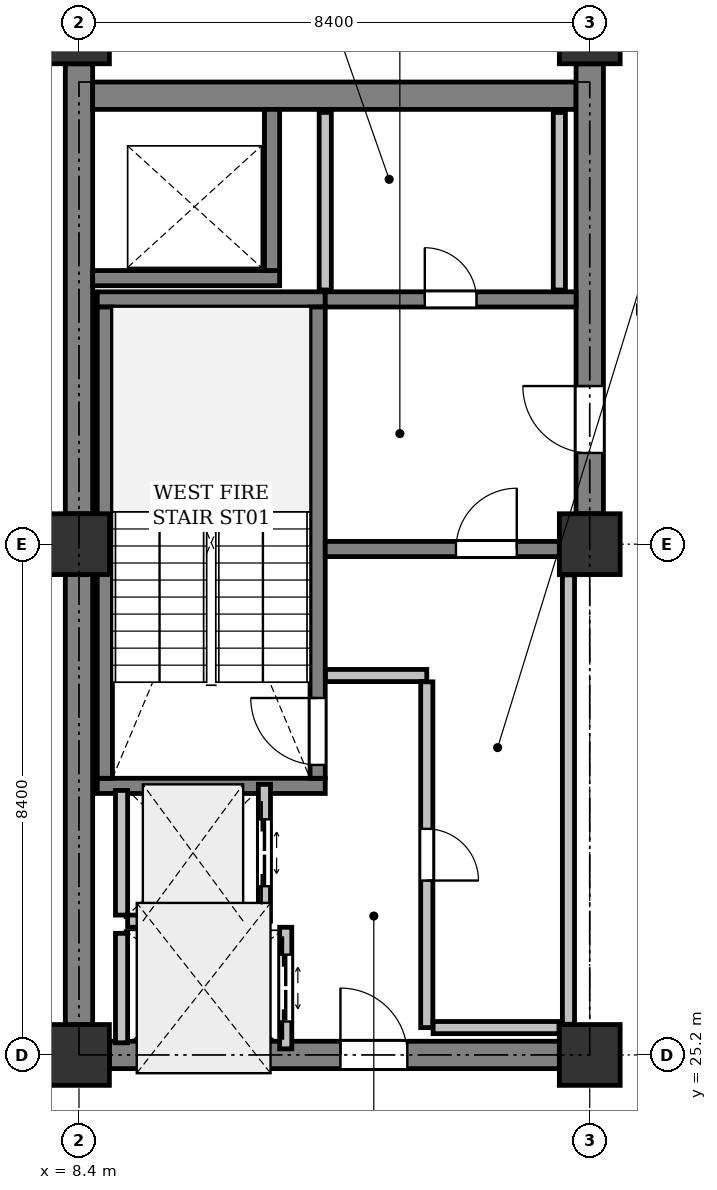
"""IFC4 building model, lengths in metres.
Left out: names, types, materials, properties, quantities, classifications, styles, units other than length and angle.
Written with IfcOpenShell. Run it as: python <this file> out.ifc"""

import sys

from ifc_helpers import new_model, si_unit, direction, frame, frame_2d, origin, origin_2d, place, context, subcontext, project, spatial, rectangle, extrude, element, fill, save


model = new_model("IFC4")
c1 = context("Model", 3, precision=1e-05, world=origin(), true_north=direction((0.0, 1.0)))
c2 = subcontext(c1, "Body", "Model", "MODEL_VIEW")
j1 = project(units=[si_unit("LENGTHUNIT", "METRE"), si_unit("PLANEANGLEUNIT", "RADIAN")], contexts=[c1])
p1 = place(None, origin())
s1 = spatial("IfcSite", under=j1, at=p1, CompositionType="ELEMENT")
p2 = place(p1, origin())
s2 = spatial("IfcBuilding", under=s1, at=p2, CompositionType="ELEMENT")
p3 = place(p2, frame((0.0, 0.0, 237.0)))
s3 = spatial("IfcBuildingStorey", under=s2, at=p3, CompositionType="ELEMENT", Elevation=237.0)
for number, where, z_axis, x_axis in (
    (1, (8.4, 25.2, 0.0), (0.0, 0.0, 1.0), (1.0, 0.0, 0.0)),
    (2, (8.4, 33.6, 0.0), (0.0, 0.0, 1.0), (1.0, 0.0, 0.0)),
    (3, (8.4, 42.0, 0.0), (0.0, 0.0, 1.0), (1.0, 0.0, 0.0)),
    (4, (16.8, 25.2, 0.0), (0.0, 0.0, 1.0), (1.0, 0.0, 0.0)),
    (5, (16.8, 33.6, 0.0), (0.0, 0.0, 1.0), (1.0, 0.0, 0.0)),
    (6, (16.8, 42.0, 0.0), (0.0, 0.0, 1.0), (1.0, 0.0, 0.0)),
):
    element("IfcColumn", number, at=place(p3, frame(where, z_axis=z_axis, x_axis=x_axis)), inside=s3, PredefinedType="COLUMN", context=c2, shape_type="SweptSolid", body=[
        extrude(rectangle(XDim=1.0, YDim=1.0, at=origin_2d()), origin(), (0.0, 0.0, 1.0), 4.1),
    ])
p4 = place(p3, frame((8.4, 25.7, 0.0), z_axis=(0.0, 0.0, 1.0), x_axis=(0.0, 1.0, 0.0)))
e7 = element("IfcWall", 7, at=p4, inside=s3, PredefinedType="SHEAR", context=c2, shape_type="SweptSolid", body=[
    extrude(rectangle(XDim=7.4, YDim=0.45, at=frame_2d((3.7, 0.0))), origin(), (0.0, 0.0, 1.0), 3.825),
])
p5 = place(p3, frame((8.4, 34.1, 0.0), z_axis=(0.0, 0.0, 1.0), x_axis=(0.0, 1.0, 0.0)))
e8 = element("IfcWall", 8, at=p5, inside=s3, PredefinedType="SHEAR", context=c2, shape_type="SweptSolid", body=[
    extrude(rectangle(XDim=7.4, YDim=0.45, at=frame_2d((3.7, 0.0))), origin(), (0.0, 0.0, 1.0), 3.825),
])
p6 = place(p3, frame((8.625, 40.975, 0.0), z_axis=(0.0, 0.0, 1.0), x_axis=(1.0, 0.0, 0.0)))
e9 = element("IfcWall", 9, at=p6, inside=s3, PredefinedType="SHEAR", context=c2, shape_type="SweptSolid", body=[
    extrude(rectangle(XDim=7.95, YDim=0.45, at=frame_2d((3.975, 0.0))), origin(), (0.0, 0.0, 1.0), 3.825),
])
p7 = place(p3, frame((16.8, 34.1, 0.0), z_axis=(0.0, 0.0, 1.0), x_axis=(0.0, 1.0, 0.0)))
e10 = element("IfcWall", 10, at=p7, inside=s3, PredefinedType="SHEAR", context=c2, shape_type="SweptSolid", body=[
    extrude(rectangle(XDim=7.4, YDim=0.45, at=frame_2d((3.7, 0.0))), origin(), (0.0, 0.0, 1.0), 3.825),
])
p8 = place(p7, frame((1.0, 0.0, 0.0)))
e11 = element("IfcOpeningElement", 11, at=p8, cuts=e10, PredefinedType="OPENING", context=c2, shape_type="SweptSolid", body=[
    extrude(rectangle(XDim=1.1, YDim=2.15, at=frame_2d((0.55, 1.075))), frame((0.0, 0.235, 0.0), z_axis=(0.0, -1.0, 0.0), x_axis=(1.0, 0.0, 0.0)), (0.0, 0.0, 1.0), 0.47),
])
p9 = place(p3, frame((8.9, 25.2, 0.0), z_axis=(0.0, 0.0, 1.0), x_axis=(1.0, 0.0, 0.0)))
e12 = element("IfcWall", 12, at=p9, inside=s3, PredefinedType="SHEAR", context=c2, shape_type="SweptSolid", body=[
    extrude(rectangle(XDim=7.4, YDim=0.45, at=frame_2d((3.7, 0.0))), origin(), (0.0, 0.0, 1.0), 3.825),
])
p10 = place(p9, frame((3.8, 0.0, 0.0)))
e13 = element("IfcOpeningElement", 13, at=p10, cuts=e12, PredefinedType="OPENING", context=c2, shape_type="SweptSolid", body=[
    extrude(rectangle(XDim=1.1, YDim=2.15, at=frame_2d((0.55, 1.075))), frame((0.0, 0.235, 0.0), z_axis=(0.0, -1.0, 0.0), x_axis=(1.0, 0.0, 0.0)), (0.0, 0.0, 1.0), 0.47),
])
for number, where, z_axis, x_axis in (
    (14, (12.45, 29.625, 0.0), (0.0, 0.0, 1.0), (-1.0, 0.0, 0.0)),
    (15, (12.45, 37.625, 0.0), (0.0, 0.0, 1.0), (-1.0, 0.0, 0.0)),
):
    element("IfcWall", number, at=place(p3, frame(where, z_axis=z_axis, x_axis=x_axis)), inside=s3, PredefinedType="SHEAR", context=c2, shape_type="SweptSolid", body=[
        extrude(rectangle(XDim=3.75, YDim=0.25, at=frame_2d((1.875, 0.0))), origin(), (0.0, 0.0, 1.0), 3.825),
    ])
p11 = place(p3, frame((12.325, 29.75, 0.0), z_axis=(0.0, 0.0, 1.0), x_axis=(0.0, 1.0, 0.0)))
e16 = element("IfcWall", 16, at=p11, inside=s3, PredefinedType="SHEAR", context=c2, shape_type="SweptSolid", body=[
    extrude(rectangle(XDim=7.75, YDim=0.25, at=frame_2d((3.875, 0.0))), origin(), (0.0, 0.0, 1.0), 3.825),
])
p12 = place(p11, frame((0.22, 0.0, 0.0)))
e17 = element("IfcOpeningElement", 17, at=p12, cuts=e16, PredefinedType="OPENING", context=c2, shape_type="SweptSolid", body=[
    extrude(rectangle(XDim=1.1, YDim=2.15, at=frame_2d((0.55, 1.075))), frame((0.0, 0.135, 0.0), z_axis=(0.0, -1.0, 0.0), x_axis=(1.0, 0.0, 0.0)), (0.0, 0.0, 1.0), 0.27),
])
p13 = place(p3, frame((8.825, 29.75, 0.0), z_axis=(0.0, 0.0, 1.0), x_axis=(0.0, 1.0, 0.0)))
e18 = element("IfcWall", 18, at=p13, inside=s3, PredefinedType="SHEAR", context=c2, shape_type="SweptSolid", body=[
    extrude(rectangle(XDim=7.75, YDim=0.25, at=frame_2d((3.875, 0.0))), origin(), (0.0, 0.0, 1.0), 3.825),
])
p14 = place(p3, frame((8.625, 37.975, 0.0), z_axis=(0.0, 0.0, 1.0), x_axis=(1.0, 0.0, 0.0)))
e19 = element("IfcWall", 19, at=p14, inside=s3, PredefinedType="SHEAR", context=c2, shape_type="SweptSolid", body=[
    extrude(rectangle(XDim=3.075, YDim=0.25, at=frame_2d((1.538, 0.0))), origin(), (0.0, 0.0, 1.0), 3.825),
])
p15 = place(p3, frame((11.575, 38.1, 0.0), z_axis=(0.0, 0.0, 1.0), x_axis=(0.0, 1.0, 0.0)))
e20 = element("IfcWall", 20, at=p15, inside=s3, PredefinedType="SHEAR", context=c2, shape_type="SweptSolid", body=[
    extrude(rectangle(XDim=2.65, YDim=0.25, at=frame_2d((1.325, 0.0))), origin(), (0.0, 0.0, 1.0), 3.825),
])
p16 = place(p3, frame((12.45, 33.52, 0.0), z_axis=(0.0, 0.0, 1.0), x_axis=(1.0, 0.0, 0.0)))
e21 = element("IfcWall", 21, at=p16, inside=s3, PredefinedType="SHEAR", context=c2, shape_type="SweptSolid", body=[
    extrude(rectangle(XDim=3.85, YDim=0.25, at=frame_2d((1.925, 0.0))), origin(), (0.0, 0.0, 1.0), 3.825),
])
p17 = place(p16, frame((2.15, 0.0, 0.0)))
e22 = element("IfcOpeningElement", 22, at=p17, cuts=e21, PredefinedType="OPENING", context=c2, shape_type="SweptSolid", body=[
    extrude(rectangle(XDim=1.0, YDim=2.15, at=frame_2d((0.5, 1.075))), frame((0.0, 0.135, 0.0), z_axis=(0.0, -1.0, 0.0), x_axis=(1.0, 0.0, 0.0)), (0.0, 0.0, 1.0), 0.27),
])
p18 = place(p3, frame((12.45, 37.625, 0.0), z_axis=(0.0, 0.0, 1.0), x_axis=(1.0, 0.0, 0.0)))
e23 = element("IfcWall", 23, at=p18, inside=s3, PredefinedType="SHEAR", context=c2, shape_type="SweptSolid", body=[
    extrude(rectangle(XDim=4.125, YDim=0.25, at=frame_2d((2.062, 0.0))), origin(), (0.0, 0.0, 1.0), 3.825),
])
p19 = place(p18, frame((1.637, 0.0, 0.0)))
e24 = element("IfcOpeningElement", 24, at=p19, cuts=e23, PredefinedType="OPENING", context=c2, shape_type="SweptSolid", body=[
    extrude(rectangle(XDim=0.85, YDim=2.15, at=frame_2d((0.425, 1.075))), frame((0.0, 0.135, 0.0), z_axis=(0.0, -1.0, 0.0), x_axis=(1.0, 0.0, 0.0)), (0.0, 0.0, 1.0), 0.27),
])
p20 = place(p3, frame((11.45, 27.4, 0.0), z_axis=(0.0, 0.0, 1.0), x_axis=(0.0, 1.0, 0.0)))
e25 = element("IfcWall", 25, at=p20, inside=s3, PredefinedType="PARTITIONING", context=c2, shape_type="SweptSolid", body=[
    extrude(rectangle(XDim=2.25, YDim=0.2, at=frame_2d((1.125, 0.0))), origin(), (0.0, 0.0, 1.0), 3.825),
])
p21 = place(p20, frame((0.575, 0.0, 0.0)))
e26 = element("IfcOpeningElement", 26, at=p21, cuts=e25, PredefinedType="OPENING", context=c2, shape_type="SweptSolid", body=[
    extrude(rectangle(XDim=1.1, YDim=2.2, at=frame_2d((0.55, 1.1))), frame((0.0, 0.11, 0.0), z_axis=(0.0, -1.0, 0.0), x_axis=(1.0, 0.0, 0.0)), (0.0, 0.0, 1.0), 0.22),
])
p22 = place(p3, frame((9.1, 27.5, 0.0), z_axis=(0.0, 0.0, 1.0), x_axis=(0.0, 1.0, 0.0)))
e27 = element("IfcWall", 27, at=p22, inside=s3, PredefinedType="PARTITIONING", context=c2, shape_type="SweptSolid", body=[
    extrude(rectangle(XDim=2.05, YDim=0.2, at=frame_2d((1.025, 0.0))), origin(), (0.0, 0.0, 1.0), 3.825),
])
p23 = place(p3, frame((9.2, 27.4, 0.0), z_axis=(0.0, 0.0, 1.0), x_axis=(1.0, 0.0, 0.0)))
e28 = element("IfcWall", 28, at=p23, inside=s3, PredefinedType="PARTITIONING", context=c2, shape_type="SweptSolid", body=[
    extrude(rectangle(XDim=2.15, YDim=0.2, at=frame_2d((1.075, 0.0))), origin(), (0.0, 0.0, 1.0), 3.825),
])
p24 = place(p3, frame((11.8, 25.3, 0.0), z_axis=(0.0, 0.0, 1.0), x_axis=(0.0, 1.0, 0.0)))
e29 = element("IfcWall", 29, at=p24, inside=s3, PredefinedType="PARTITIONING", context=c2, shape_type="SweptSolid", body=[
    extrude(rectangle(XDim=2.0, YDim=0.2, at=frame_2d((1.0, 0.0))), origin(), (0.0, 0.0, 1.0), 3.825),
])
p25 = place(p24, frame((0.45, 0.0, 0.0)))
e30 = element("IfcOpeningElement", 30, at=p25, cuts=e29, PredefinedType="OPENING", context=c2, shape_type="SweptSolid", body=[
    extrude(rectangle(XDim=1.1, YDim=2.2, at=frame_2d((0.55, 1.1))), frame((0.0, 0.11, 0.0), z_axis=(0.0, -1.0, 0.0), x_axis=(1.0, 0.0, 0.0)), (0.0, 0.0, 1.0), 0.22),
])
p26 = place(p3, frame((9.1, 25.4, 0.0), z_axis=(0.0, 0.0, 1.0), x_axis=(0.0, 1.0, 0.0)))
e31 = element("IfcWall", 31, at=p26, inside=s3, PredefinedType="PARTITIONING", context=c2, shape_type="SweptSolid", body=[
    extrude(rectangle(XDim=1.8, YDim=0.2, at=frame_2d((0.9, 0.0))), origin(), (0.0, 0.0, 1.0), 3.825),
])
p27 = place(p3, frame((16.45, 25.705, 0.0), z_axis=(0.0, 0.0, 1.0), x_axis=(0.0, 1.0, 0.0)))
e32 = element("IfcWall", 32, at=p27, inside=s3, PredefinedType="PARTITIONING", context=c2, shape_type="SweptSolid", body=[
    extrude(rectangle(XDim=7.39, YDim=0.2, at=frame_2d((3.695, 0.0))), origin(), (0.0, 0.0, 1.0), 3.825),
])
p28 = place(p3, frame((12.454, 31.44, 0.0), z_axis=(0.0, 0.0, 1.0), x_axis=(1.0, 0.0, 0.0)))
e33 = element("IfcWall", 33, at=p28, inside=s3, PredefinedType="PARTITIONING", context=c2, shape_type="SweptSolid", body=[
    extrude(rectangle(XDim=1.666, YDim=0.2, at=frame_2d((0.833, 0.0))), origin(), (0.0, 0.0, 1.0), 3.825),
])
p29 = place(p3, frame((14.12, 31.336, 0.0), z_axis=(0.0, 0.0, 1.0), x_axis=(0.0, -1.0, 0.0)))
e34 = element("IfcWall", 34, at=p29, inside=s3, PredefinedType="PARTITIONING", context=c2, shape_type="SweptSolid", body=[
    extrude(rectangle(XDim=5.686, YDim=0.2, at=frame_2d((2.843, 0.0))), origin(), (0.0, 0.0, 1.0), 3.825),
])
p30 = place(p29, frame((2.418, 0.0, 0.0)))
e35 = element("IfcOpeningElement", 35, at=p30, cuts=e34, PredefinedType="OPENING", context=c2, shape_type="SweptSolid", body=[
    extrude(rectangle(XDim=0.85, YDim=2.15, at=frame_2d((0.425, 1.075))), frame((0.0, 0.11, 0.0), z_axis=(0.0, -1.0, 0.0), x_axis=(1.0, 0.0, 0.0)), (0.0, 0.0, 1.0), 0.22),
])
p31 = place(p3, frame((14.224, 25.65, 0.0), z_axis=(0.0, 0.0, 1.0), x_axis=(1.0, 0.0, 0.0)))
e36 = element("IfcWall", 36, at=p31, inside=s3, PredefinedType="PARTITIONING", context=c2, shape_type="SweptSolid", body=[
    extrude(rectangle(XDim=2.071, YDim=0.2, at=frame_2d((1.035, 0.0))), origin(), (0.0, 0.0, 1.0), 3.825),
])
for number, where, z_axis, x_axis in (
    (37, (16.3, 37.78, 0.0), (0.0, 0.0, 1.0), (0.0, 1.0, 0.0)),
    (38, (12.45, 40.7, 0.0), (0.0, 0.0, 1.0), (0.0, -1.0, 0.0)),
):
    element("IfcWall", number, at=place(p3, frame(where, z_axis=z_axis, x_axis=x_axis)), inside=s3, PredefinedType="PARTITIONING", context=c2, shape_type="SweptSolid", body=[
        extrude(rectangle(XDim=2.92, YDim=0.2, at=frame_2d((1.46, 0.0))), origin(), (0.0, 0.0, 1.0), 2.875),
    ])
p32 = place(p8, origin())
e39 = element("IfcDoor", 39, at=p32, inside=s3, OperationType="SINGLE_SWING_RIGHT", PredefinedType="DOOR", context=c2, shape_type="SweptSolid", body=[
    extrude(rectangle(XDim=1.1, YDim=2.15, at=frame_2d((0.55, 1.075))), frame((0.0, 0.025, 0.0), z_axis=(0.0, -1.0, 0.0), x_axis=(1.0, 0.0, 0.0)), (0.0, 0.0, 1.0), 0.05),
])
fill(e11, e39)
p33 = place(p10, origin())
e40 = element("IfcDoor", 40, at=p33, inside=s3, OperationType="SINGLE_SWING_LEFT", PredefinedType="DOOR", context=c2, shape_type="SweptSolid", body=[
    extrude(rectangle(XDim=1.1, YDim=2.15, at=frame_2d((0.55, 1.075))), frame((0.0, 0.025, 0.0), z_axis=(0.0, -1.0, 0.0), x_axis=(1.0, 0.0, 0.0)), (0.0, 0.0, 1.0), 0.05),
])
fill(e13, e40)
p34 = place(p12, origin())
e41 = element("IfcDoor", 41, at=p34, inside=s3, OperationType="SINGLE_SWING_RIGHT", PredefinedType="DOOR", context=c2, shape_type="SweptSolid", body=[
    extrude(rectangle(XDim=1.1, YDim=2.15, at=frame_2d((0.55, 1.075))), frame((0.0, 0.025, 0.0), z_axis=(0.0, -1.0, 0.0), x_axis=(1.0, 0.0, 0.0)), (0.0, 0.0, 1.0), 0.05),
])
fill(e17, e41)
p35 = place(p17, origin())
e42 = element("IfcDoor", 42, at=p35, inside=s3, OperationType="SINGLE_SWING_RIGHT", PredefinedType="DOOR", context=c2, shape_type="SweptSolid", body=[
    extrude(rectangle(XDim=1.0, YDim=2.15, at=frame_2d((0.5, 1.075))), frame((0.0, 0.025, 0.0), z_axis=(0.0, -1.0, 0.0), x_axis=(1.0, 0.0, 0.0)), (0.0, 0.0, 1.0), 0.05),
])
fill(e22, e42)
p36 = place(p21, origin())
e43 = element("IfcDoor", 43, at=p36, inside=s3, OperationType="DOUBLE_DOOR_SLIDING", PredefinedType="DOOR", context=c2, shape_type="SweptSolid", body=[
    extrude(rectangle(XDim=1.1, YDim=2.2, at=frame_2d((0.55, 1.1))), frame((0.0, 0.025, 0.0), z_axis=(0.0, -1.0, 0.0), x_axis=(1.0, 0.0, 0.0)), (0.0, 0.0, 1.0), 0.05),
])
fill(e26, e43)
p37 = place(p25, origin())
e44 = element("IfcDoor", 44, at=p37, inside=s3, OperationType="DOUBLE_DOOR_SLIDING", PredefinedType="DOOR", context=c2, shape_type="SweptSolid", body=[
    extrude(rectangle(XDim=1.1, YDim=2.2, at=frame_2d((0.55, 1.1))), frame((0.0, 0.025, 0.0), z_axis=(0.0, -1.0, 0.0), x_axis=(1.0, 0.0, 0.0)), (0.0, 0.0, 1.0), 0.05),
])
fill(e30, e44)
p38 = place(p30, origin())
e45 = element("IfcDoor", 45, at=p38, inside=s3, OperationType="SINGLE_SWING_RIGHT", PredefinedType="DOOR", context=c2, shape_type="SweptSolid", body=[
    extrude(rectangle(XDim=0.85, YDim=2.15, at=frame_2d((0.425, 1.075))), frame((0.0, 0.025, 0.0), z_axis=(0.0, -1.0, 0.0), x_axis=(1.0, 0.0, 0.0)), (0.0, 0.0, 1.0), 0.05),
])
fill(e35, e45)
p39 = place(p19, origin())
e46 = element("IfcDoor", 46, at=p39, inside=s3, OperationType="SINGLE_SWING_LEFT", PredefinedType="DOOR", context=c2, shape_type="SweptSolid", body=[
    extrude(rectangle(XDim=0.85, YDim=2.15, at=frame_2d((0.425, 1.075))), frame((0.0, 0.025, 0.0), z_axis=(0.0, -1.0, 0.0), x_axis=(1.0, 0.0, 0.0)), (0.0, 0.0, 1.0), 0.05),
])
fill(e24, e46)
save(model, sys.argv[1])
